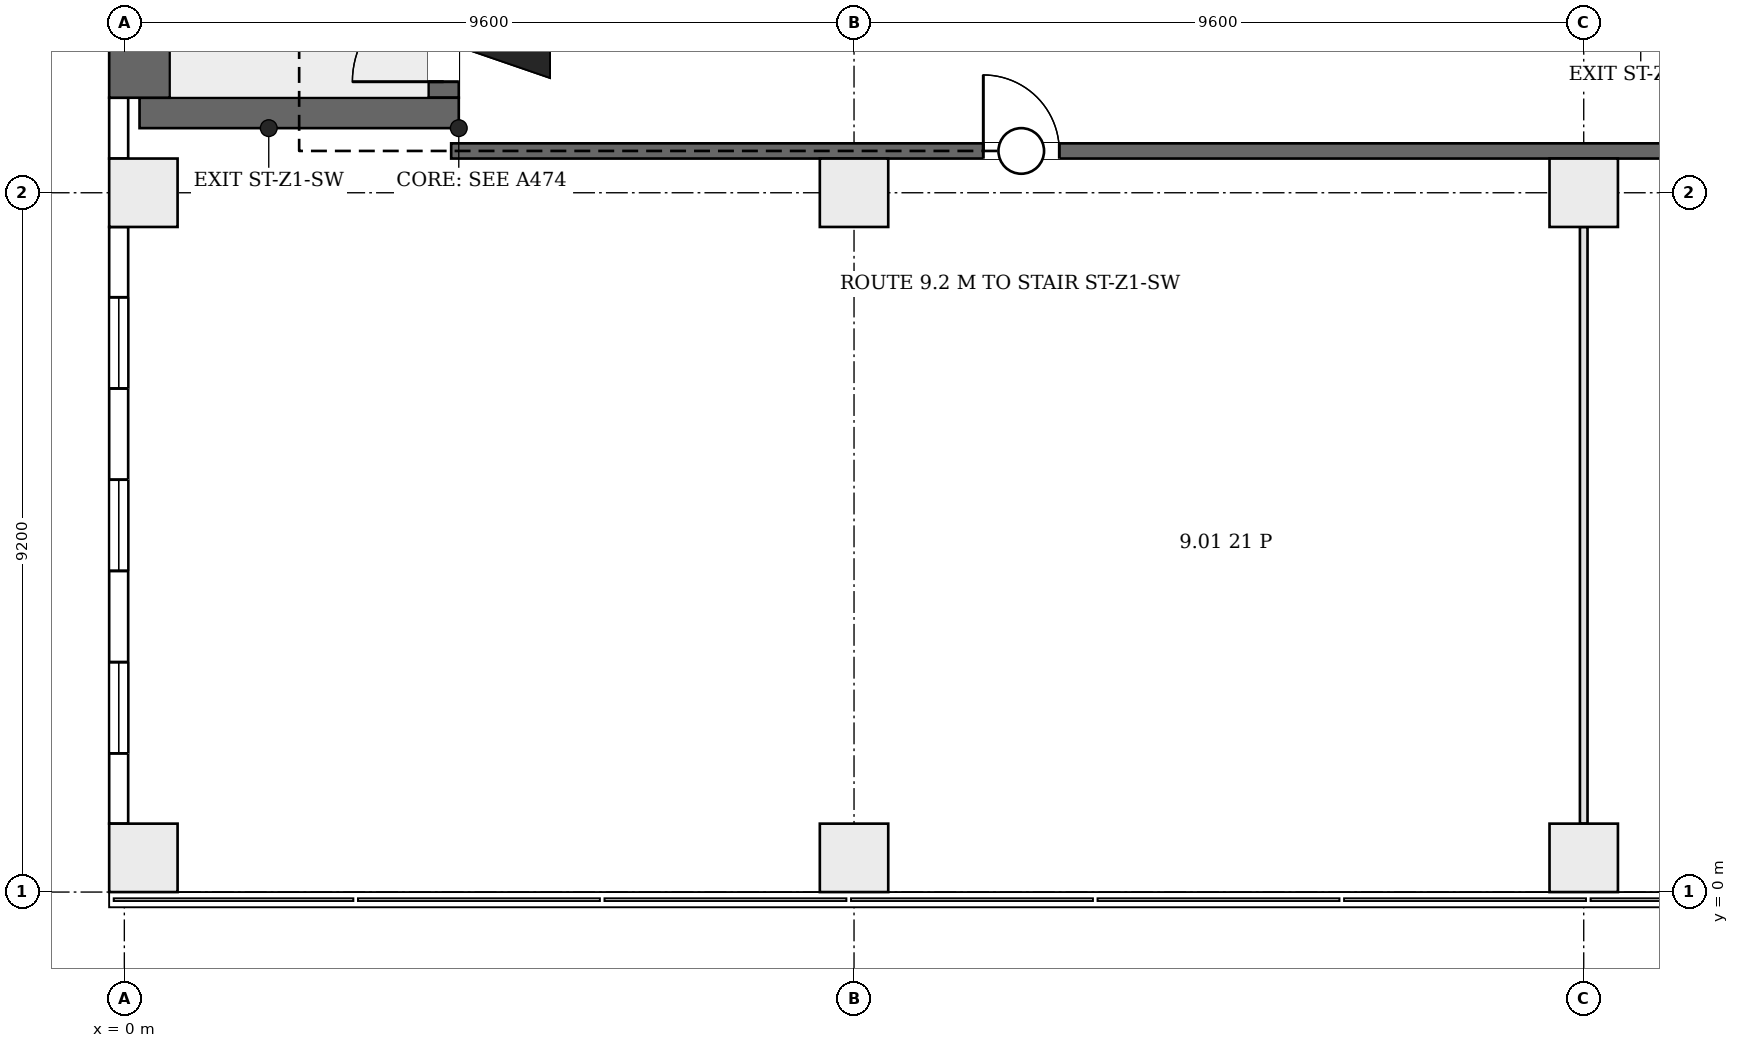
"""IFC4 building model, lengths in metres.
Left out: names, types, materials, properties, quantities, classifications, styles, units other than length and angle.
Written with IfcOpenShell. Run it as: python <this file> out.ifc"""

import sys

from ifc_helpers import new_model, si_unit, direction, frame, frame_2d, origin, origin_2d, place, context, subcontext, project, spatial, rectangle, extrude, element, fill, save


model = new_model("IFC4")
c1 = context("Model", 3, precision=1e-05, world=origin(), true_north=direction((0.0, 1.0)))
c2 = subcontext(c1, "Body", "Model", "MODEL_VIEW")
j1 = project(units=[si_unit("LENGTHUNIT", "METRE"), si_unit("PLANEANGLEUNIT", "RADIAN")], contexts=[c1])
p1 = place(None, origin())
s1 = spatial("IfcSite", under=j1, at=p1, CompositionType="ELEMENT")
p2 = place(p1, origin())
s2 = spatial("IfcBuilding", under=s1, at=p2, CompositionType="ELEMENT")
p3 = place(p2, frame((0.0, 0.0, 48.7)))
s3 = spatial("IfcBuildingStorey", under=s2, at=p3, CompositionType="ELEMENT", Elevation=48.7)
p4 = place(p3, frame((0.2, 10.25, 0.0), z_axis=(0.0, 0.0, 1.0), x_axis=(1.0, 0.0, 0.0)))
e1 = element("IfcWall", 1, at=p4, inside=s3, PredefinedType="SHEAR", context=c2, shape_type="SweptSolid", body=[
    extrude(rectangle(XDim=4.2, YDim=0.4, at=frame_2d((2.1, 0.0))), origin(), (0.0, 0.0, 1.0), 4.2),
])
p5 = place(p3, frame((0.2, 10.45, 0.0), z_axis=(0.0, 0.0, 1.0), x_axis=(0.0, 1.0, 0.0)))
e2 = element("IfcWall", 2, at=p5, inside=s3, PredefinedType="SHEAR", context=c2, shape_type="SweptSolid", body=[
    extrude(rectangle(XDim=6.6, YDim=0.8, at=frame_2d((3.3, 0.0))), origin(), (0.0, 0.0, 1.0), 4.2),
])
p6 = place(p3, frame((4.2, 10.45, 0.0), z_axis=(0.0, 0.0, 1.0), x_axis=(0.0, 1.0, 0.0)))
e3 = element("IfcWall", 3, at=p6, inside=s3, PredefinedType="SHEAR", context=c2, shape_type="SweptSolid", body=[
    extrude(rectangle(XDim=6.6, YDim=0.4, at=frame_2d((3.3, 0.0))), origin(), (0.0, 0.0, 1.0), 4.2),
])
p7 = place(p6, frame((0.21, 0.0, 0.0)))
e4 = element("IfcOpeningElement", 4, at=p7, cuts=e3, PredefinedType="OPENING", context=c2, shape_type="SweptSolid", body=[
    extrude(rectangle(XDim=1.2, YDim=2.1, at=frame_2d((0.6, 1.05))), frame((0.0, 0.21, 0.0), z_axis=(0.0, -1.0, 0.0), x_axis=(1.0, 0.0, 0.0)), (0.0, 0.0, 1.0), 0.42),
])
for number, where, z_axis, x_axis in (
    (5, (0.25, 0.45, 0.0), (0.0, 0.0, 1.0), (1.0, 0.0, 0.0)),
    (6, (9.6, 0.45, 0.0), (0.0, 0.0, 1.0), (1.0, 0.0, 0.0)),
    (7, (19.2, 0.45, 0.0), (0.0, 0.0, 1.0), (1.0, 0.0, 0.0)),
    (8, (0.25, 9.2, 0.0), (0.0, 0.0, 1.0), (1.0, 0.0, 0.0)),
    (9, (9.6, 9.2, 0.0), (0.0, 0.0, 1.0), (1.0, 0.0, 0.0)),
    (10, (19.2, 9.2, 0.0), (0.0, 0.0, 1.0), (1.0, 0.0, 0.0)),
):
    element("IfcColumn", number, at=place(p3, frame(where, z_axis=z_axis, x_axis=x_axis)), inside=s3, PredefinedType="COLUMN", context=c2, shape_type="SweptSolid", body=[
        extrude(rectangle(XDim=0.9, YDim=0.9, at=origin_2d()), origin(), (0.0, 0.0, 1.0), 4.2),
    ])
p8 = place(p3, frame((-0.074, 8.75, 0.0), z_axis=(0.0, 0.0, 1.0), x_axis=(0.0, -1.0, 0.0)))
e11 = element("IfcWall", 11, at=p8, inside=s3, PredefinedType="ELEMENTEDWALL", context=c2, shape_type="SweptSolid", body=[
    extrude(rectangle(XDim=7.85, YDim=0.25, at=frame_2d((3.925, 0.0))), origin(), (0.0, 0.0, 1.0), 3.9),
])
p9 = place(p8, frame((5.725, 0.0, 0.9)))
e12 = element("IfcOpeningElement", 12, at=p9, cuts=e11, PredefinedType="OPENING", context=c2, shape_type="SweptSolid", body=[
    extrude(rectangle(XDim=1.2, YDim=2.6, at=frame_2d((0.6, 1.3))), frame((0.0, 0.135, 0.0), z_axis=(0.0, -1.0, 0.0), x_axis=(1.0, 0.0, 0.0)), (0.0, 0.0, 1.0), 0.27),
])
p10 = place(p8, frame((3.325, 0.0, 0.9)))
e13 = element("IfcOpeningElement", 13, at=p10, cuts=e11, PredefinedType="OPENING", context=c2, shape_type="SweptSolid", body=[
    extrude(rectangle(XDim=1.2, YDim=2.6, at=frame_2d((0.6, 1.3))), frame((0.0, 0.135, 0.0), z_axis=(0.0, -1.0, 0.0), x_axis=(1.0, 0.0, 0.0)), (0.0, 0.0, 1.0), 0.27),
])
p11 = place(p8, frame((0.925, 0.0, 0.9)))
e14 = element("IfcOpeningElement", 14, at=p11, cuts=e11, PredefinedType="OPENING", context=c2, shape_type="SweptSolid", body=[
    extrude(rectangle(XDim=1.2, YDim=2.6, at=frame_2d((0.6, 1.3))), frame((0.0, 0.135, 0.0), z_axis=(0.0, -1.0, 0.0), x_axis=(1.0, 0.0, 0.0)), (0.0, 0.0, 1.0), 0.27),
])
p12 = place(p3, frame((-0.074, 10.45, 0.0), z_axis=(0.0, 0.0, 1.0), x_axis=(0.0, -1.0, 0.0)))
e15 = element("IfcWall", 15, at=p12, inside=s3, PredefinedType="ELEMENTEDWALL", context=c2, shape_type="SweptSolid", body=[
    extrude(rectangle(XDim=0.8, YDim=0.25, at=frame_2d((0.4, 0.0))), origin(), (0.0, 0.0, 1.0), 3.9),
])
p13 = place(p3, frame((4.3, 9.75, 0.0), z_axis=(0.0, 0.0, 1.0), x_axis=(1.0, 0.0, 0.0)))
e16 = element("IfcWall", 16, at=p13, inside=s3, PredefinedType="PARTITIONING", context=c2, shape_type="SweptSolid", body=[
    extrude(rectangle(XDim=43.894, YDim=0.2, at=frame_2d((21.947, 0.0))), origin(), (0.0, 0.0, 1.0), 3.9),
])
p14 = place(p13, frame((7.0, 0.0, 0.0)))
e17 = element("IfcOpeningElement", 17, at=p14, cuts=e16, PredefinedType="OPENING", context=c2, shape_type="SweptSolid", body=[
    extrude(rectangle(XDim=1.0, YDim=2.1, at=frame_2d((0.5, 1.05))), frame((0.0, 0.11, 0.0), z_axis=(0.0, -1.0, 0.0), x_axis=(1.0, 0.0, 0.0)), (0.0, 0.0, 1.0), 0.22),
])
p15 = place(p13, frame((19.2, 0.0, 0.0)))
e18 = element("IfcOpeningElement", 18, at=p15, cuts=e16, PredefinedType="OPENING", context=c2, shape_type="SweptSolid", body=[
    extrude(rectangle(XDim=1.0, YDim=2.1, at=frame_2d((0.5, 1.05))), frame((0.0, 0.11, 0.0), z_axis=(0.0, -1.0, 0.0), x_axis=(1.0, 0.0, 0.0)), (0.0, 0.0, 1.0), 0.22),
])
p16 = place(p13, frame((30.95, 0.0, 0.0)))
e19 = element("IfcOpeningElement", 19, at=p16, cuts=e16, PredefinedType="OPENING", context=c2, shape_type="SweptSolid", body=[
    extrude(rectangle(XDim=1.5, YDim=2.1, at=frame_2d((0.75, 1.05))), frame((0.0, 0.11, 0.0), z_axis=(0.0, -1.0, 0.0), x_axis=(1.0, 0.0, 0.0)), (0.0, 0.0, 1.0), 0.22),
])
p17 = place(p13, frame((40.9, 0.0, 0.0)))
e20 = element("IfcOpeningElement", 20, at=p17, cuts=e16, PredefinedType="OPENING", context=c2, shape_type="SweptSolid", body=[
    extrude(rectangle(XDim=1.0, YDim=2.1, at=frame_2d((0.5, 1.05))), frame((0.0, 0.11, 0.0), z_axis=(0.0, -1.0, 0.0), x_axis=(1.0, 0.0, 0.0)), (0.0, 0.0, 1.0), 0.22),
])
p18 = place(p3, frame((19.2, 0.9, 0.0), z_axis=(0.0, 0.0, 1.0), x_axis=(0.0, 1.0, 0.0)))
e21 = element("IfcWall", 21, at=p18, inside=s3, PredefinedType="PARTITIONING", context=c2, shape_type="SweptSolid", body=[
    extrude(rectangle(XDim=7.85, YDim=0.1, at=frame_2d((3.925, 0.0))), origin(), (0.0, 0.0, 1.0), 3.9),
])
p19 = place(p9, origin())
e22 = element("IfcWindow", 22, at=p19, inside=s3, PartitioningType="SINGLE_PANEL", PredefinedType="WINDOW", context=c2, shape_type="SweptSolid", body=[
    extrude(rectangle(XDim=1.2, YDim=2.6, at=frame_2d((0.6, 1.3))), frame((0.0, 0.03, 0.0), z_axis=(0.0, -1.0, 0.0), x_axis=(1.0, 0.0, 0.0)), (0.0, 0.0, 1.0), 0.06),
])
fill(e12, e22)
p20 = place(p10, origin())
e23 = element("IfcWindow", 23, at=p20, inside=s3, PartitioningType="SINGLE_PANEL", PredefinedType="WINDOW", context=c2, shape_type="SweptSolid", body=[
    extrude(rectangle(XDim=1.2, YDim=2.6, at=frame_2d((0.6, 1.3))), frame((0.0, 0.03, 0.0), z_axis=(0.0, -1.0, 0.0), x_axis=(1.0, 0.0, 0.0)), (0.0, 0.0, 1.0), 0.06),
])
fill(e13, e23)
p21 = place(p11, origin())
e24 = element("IfcWindow", 24, at=p21, inside=s3, PartitioningType="SINGLE_PANEL", PredefinedType="WINDOW", context=c2, shape_type="SweptSolid", body=[
    extrude(rectangle(XDim=1.2, YDim=2.6, at=frame_2d((0.6, 1.3))), frame((0.0, 0.03, 0.0), z_axis=(0.0, -1.0, 0.0), x_axis=(1.0, 0.0, 0.0)), (0.0, 0.0, 1.0), 0.06),
])
fill(e14, e24)
p22 = place(p7, origin())
e25 = element("IfcDoor", 25, at=p22, inside=s3, OperationType="SINGLE_SWING_RIGHT", PredefinedType="DOOR", context=c2, shape_type="SweptSolid", body=[
    extrude(rectangle(XDim=1.2, YDim=2.1, at=frame_2d((0.6, 1.05))), frame((0.0, 0.025, 0.0), z_axis=(0.0, -1.0, 0.0), x_axis=(1.0, 0.0, 0.0)), (0.0, 0.0, 1.0), 0.05),
])
fill(e4, e25)
p23 = place(p14, origin())
e26 = element("IfcDoor", 26, at=p23, inside=s3, OperationType="SINGLE_SWING_RIGHT", PredefinedType="DOOR", context=c2, shape_type="SweptSolid", body=[
    extrude(rectangle(XDim=1.0, YDim=2.1, at=frame_2d((0.5, 1.05))), frame((0.0, 0.025, 0.0), z_axis=(0.0, -1.0, 0.0), x_axis=(1.0, 0.0, 0.0)), (0.0, 0.0, 1.0), 0.05),
])
fill(e17, e26)
save(model, sys.argv[1])
